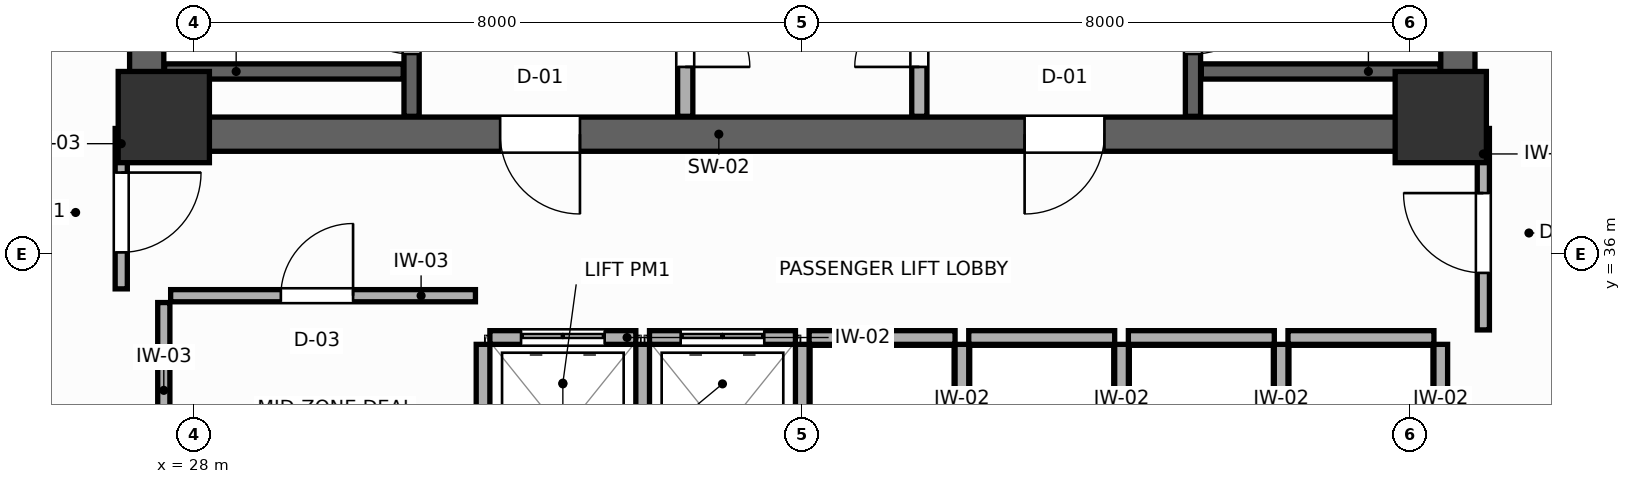
"""IFC4 building model, lengths in metres.
Left out: names, types, materials, properties, quantities, classifications, styles, units other than length and angle.
Written with IfcOpenShell. Run it as: python <this file> out.ifc"""

import sys

from ifc_helpers import new_model, si_unit, direction, frame, frame_2d, origin, origin_2d, place, context, subcontext, project, spatial, rectangle, extrude, source, transform, mapped, element, fill, save


model = new_model("IFC4")
c1 = context("Model", 3, precision=1e-05, world=origin(), true_north=direction((0.0, 1.0)))
c2 = subcontext(c1, "Body", "Model", "MODEL_VIEW")
j1 = project(units=[si_unit("LENGTHUNIT", "METRE"), si_unit("PLANEANGLEUNIT", "RADIAN")], contexts=[c1])
p1 = place(None, origin())
s1 = spatial("IfcSite", under=j1, at=p1, CompositionType="ELEMENT")
p2 = place(p1, origin())
s2 = spatial("IfcBuilding", under=s1, at=p2, CompositionType="ELEMENT")
p3 = place(p2, frame((0.0, 0.0, 113.4)))
s3 = spatial("IfcBuildingStorey", under=s2, at=p3, CompositionType="ELEMENT", Elevation=113.4)
p4 = place(p3, frame((27.15, 37.575, 0.0), z_axis=(0.0, 0.0, 1.0), x_axis=(1.0, 0.0, 0.0)))
e1 = element("IfcWall", 1, at=p4, inside=s3, PredefinedType="SHEAR", context=c2, shape_type="SweptSolid", body=[
    extrude(rectangle(XDim=17.7, YDim=0.45, at=frame_2d((8.85, 0.0))), origin(), (0.0, 0.0, 1.0), 3.6),
])
p5 = place(p4, frame((4.875, 0.0, 0.0)))
e2 = element("IfcOpeningElement", 2, at=p5, cuts=e1, PredefinedType="OPENING", context=c2, shape_type="SweptSolid", body=[
    extrude(rectangle(XDim=1.05, YDim=2.1, at=frame_2d((0.525, 1.05))), frame((0.0, 0.235, 0.0), z_axis=(0.0, -1.0, 0.0), x_axis=(1.0, 0.0, 0.0)), (0.0, 0.0, 1.0), 0.47),
])
p6 = place(p4, frame((11.775, 0.0, 0.0)))
e3 = element("IfcOpeningElement", 3, at=p6, cuts=e1, PredefinedType="OPENING", context=c2, shape_type="SweptSolid", body=[
    extrude(rectangle(XDim=1.05, YDim=2.1, at=frame_2d((0.525, 1.05))), frame((0.0, 0.235, 0.0), z_axis=(0.0, -1.0, 0.0), x_axis=(1.0, 0.0, 0.0)), (0.0, 0.0, 1.0), 0.47),
])
for number, where, z_axis, x_axis in (
    (4, (27.375, 37.8, 0.0), (0.0, 0.0, 1.0), (0.0, 1.0, 0.0)),
    (5, (44.625, 37.8, 0.0), (0.0, 0.0, 1.0), (0.0, 1.0, 0.0)),
):
    element("IfcWall", number, at=place(p3, frame(where, z_axis=z_axis, x_axis=x_axis)), inside=s3, PredefinedType="SHEAR", context=c2, shape_type="SweptSolid", body=[
        extrude(rectangle(XDim=9.0, YDim=0.45, at=frame_2d((4.5, 0.0))), origin(), (0.0, 0.0, 1.0), 3.6),
    ])
m1 = source(origin(), c2, "Body", "SweptSolid", [
    extrude(rectangle(XDim=1.2, YDim=1.2, at=origin_2d()), origin(), (0.0, 0.0, 1.0), 3.6),
])
for number, where, z_axis, x_axis in (
    (6, (27.6, 37.8, 0.0), (0.0, 0.0, 1.0), (1.0, 0.0, 0.0)),
    (7, (44.4, 37.8, 0.0), (0.0, 0.0, 1.0), (1.0, 0.0, 0.0)),
):
    element("IfcColumn", number, at=place(p3, frame(where, z_axis=z_axis, x_axis=x_axis)), inside=s3, PredefinedType="COLUMN", context=c2, shape_type="MappedRepresentation", body=[
        mapped(m1, transform((0.0, 0.0, 0.0), scale=1.0)),
    ])
p7 = place(p3, frame((30.86, 37.81, 0.0), z_axis=(0.0, 0.0, 1.0), x_axis=(0.0, 1.0, 0.0)))
e8 = element("IfcWall", 8, at=p7, inside=s3, PredefinedType="SHEAR", context=c2, shape_type="SweptSolid", body=[
    extrude(rectangle(XDim=8.98, YDim=0.2, at=frame_2d((4.49, 0.0))), origin(), (0.0, 0.0, 1.0), 3.6),
])
p8 = place(p7, frame((0.82, 0.0, 0.0)))
e9 = element("IfcOpeningElement", 9, at=p8, cuts=e8, PredefinedType="OPENING", context=c2, shape_type="SweptSolid", body=[
    extrude(rectangle(XDim=1.05, YDim=2.1, at=frame_2d((0.525, 1.05))), frame((0.0, 0.11, 0.0), z_axis=(0.0, -1.0, 0.0), x_axis=(1.0, 0.0, 0.0)), (0.0, 0.0, 1.0), 0.22),
])
p9 = place(p3, frame((27.61, 38.4, 0.0), z_axis=(0.0, 0.0, 1.0), x_axis=(1.0, 0.0, 0.0)))
e10 = element("IfcWall", 10, at=p9, inside=s3, PredefinedType="SHEAR", context=c2, shape_type="SweptSolid", body=[
    extrude(rectangle(XDim=3.14, YDim=0.2, at=frame_2d((1.57, 0.0))), origin(), (0.0, 0.0, 1.0), 3.6),
])
p10 = place(p3, frame((41.14, 37.81, 0.0), z_axis=(0.0, 0.0, 1.0), x_axis=(0.0, 1.0, 0.0)))
e11 = element("IfcWall", 11, at=p10, inside=s3, PredefinedType="SHEAR", context=c2, shape_type="SweptSolid", body=[
    extrude(rectangle(XDim=8.98, YDim=0.2, at=frame_2d((4.49, 0.0))), origin(), (0.0, 0.0, 1.0), 3.6),
])
p11 = place(p10, frame((0.82, 0.0, 0.0)))
e12 = element("IfcOpeningElement", 12, at=p11, cuts=e11, PredefinedType="OPENING", context=c2, shape_type="SweptSolid", body=[
    extrude(rectangle(XDim=1.05, YDim=2.1, at=frame_2d((0.525, 1.05))), frame((0.0, 0.11, 0.0), z_axis=(0.0, -1.0, 0.0), x_axis=(1.0, 0.0, 0.0)), (0.0, 0.0, 1.0), 0.22),
])
p12 = place(p3, frame((41.25, 38.4, 0.0), z_axis=(0.0, 0.0, 1.0), x_axis=(1.0, 0.0, 0.0)))
e13 = element("IfcWall", 13, at=p12, inside=s3, PredefinedType="SHEAR", context=c2, shape_type="SweptSolid", body=[
    extrude(rectangle(XDim=3.14, YDim=0.2, at=frame_2d((1.57, 0.0))), origin(), (0.0, 0.0, 1.0), 3.6),
])
p13 = place(p3, frame((34.46, 37.81, 0.0), z_axis=(0.0, 0.0, 1.0), x_axis=(0.0, 1.0, 0.0)))
e14 = element("IfcWall", 14, at=p13, inside=s3, PredefinedType="PARTITIONING", context=c2, shape_type="SweptSolid", body=[
    extrude(rectangle(XDim=8.98, YDim=0.2, at=frame_2d((4.49, 0.0))), origin(), (0.0, 0.0, 1.0), 3.4),
])
p14 = place(p13, frame((0.65, 0.0, 0.0)))
e15 = element("IfcOpeningElement", 15, at=p14, cuts=e14, PredefinedType="OPENING", context=c2, shape_type="SweptSolid", body=[
    extrude(rectangle(XDim=0.85, YDim=2.05, at=frame_2d((0.425, 1.025))), frame((0.0, 0.11, 0.0), z_axis=(0.0, -1.0, 0.0), x_axis=(1.0, 0.0, 0.0)), (0.0, 0.0, 1.0), 0.22),
])
p15 = place(p3, frame((37.54, 37.81, 0.0), z_axis=(0.0, 0.0, 1.0), x_axis=(0.0, 1.0, 0.0)))
e16 = element("IfcWall", 16, at=p15, inside=s3, PredefinedType="PARTITIONING", context=c2, shape_type="SweptSolid", body=[
    extrude(rectangle(XDim=8.98, YDim=0.2, at=frame_2d((4.49, 0.0))), origin(), (0.0, 0.0, 1.0), 3.4),
])
p16 = place(p15, frame((0.65, 0.0, 0.0)))
e17 = element("IfcOpeningElement", 17, at=p16, cuts=e16, PredefinedType="OPENING", context=c2, shape_type="SweptSolid", body=[
    extrude(rectangle(XDim=0.85, YDim=2.05, at=frame_2d((0.425, 1.025))), frame((0.0, 0.11, 0.0), z_axis=(0.0, -1.0, 0.0), x_axis=(1.0, 0.0, 0.0)), (0.0, 0.0, 1.0), 0.22),
])
p17 = place(p3, frame((31.89, 34.9, 0.0), z_axis=(0.0, 0.0, 1.0), x_axis=(1.0, 0.0, 0.0)))
e18 = element("IfcWall", 18, at=p17, inside=s3, PredefinedType="PARTITIONING", context=c2, shape_type="SweptSolid", body=[
    extrude(rectangle(XDim=1.92, YDim=0.18, at=frame_2d((0.96, 0.0))), origin(), (0.0, 0.0, 1.0), 3.4),
])
p18 = place(p17, frame((0.41, 0.0, 0.0)))
e19 = element("IfcOpeningElement", 19, at=p18, cuts=e18, PredefinedType="OPENING", context=c2, shape_type="SweptSolid", body=[
    extrude(rectangle(XDim=1.1, YDim=2.1, at=frame_2d((0.55, 1.05))), frame((0.0, 0.1, 0.0), z_axis=(0.0, -1.0, 0.0), x_axis=(1.0, 0.0, 0.0)), (0.0, 0.0, 1.0), 0.2),
])
p19 = place(p3, frame((31.8, 32.49, 0.0), z_axis=(0.0, 0.0, 1.0), x_axis=(0.0, 1.0, 0.0)))
e20 = element("IfcWall", 20, at=p19, inside=s3, PredefinedType="PARTITIONING", context=c2, shape_type="SweptSolid", body=[
    extrude(rectangle(XDim=2.32, YDim=0.18, at=frame_2d((1.16, 0.0))), origin(), (0.0, 0.0, 1.0), 3.4),
])
p20 = place(p3, frame((33.99, 34.9, 0.0), z_axis=(0.0, 0.0, 1.0), x_axis=(1.0, 0.0, 0.0)))
e21 = element("IfcWall", 21, at=p20, inside=s3, PredefinedType="PARTITIONING", context=c2, shape_type="SweptSolid", body=[
    extrude(rectangle(XDim=1.92, YDim=0.18, at=frame_2d((0.96, 0.0))), origin(), (0.0, 0.0, 1.0), 3.4),
])
p21 = place(p20, frame((0.41, 0.0, 0.0)))
e22 = element("IfcOpeningElement", 22, at=p21, cuts=e21, PredefinedType="OPENING", context=c2, shape_type="SweptSolid", body=[
    extrude(rectangle(XDim=1.1, YDim=2.1, at=frame_2d((0.55, 1.05))), frame((0.0, 0.1, 0.0), z_axis=(0.0, -1.0, 0.0), x_axis=(1.0, 0.0, 0.0)), (0.0, 0.0, 1.0), 0.2),
])
p22 = place(p3, frame((33.9, 32.49, 0.0), z_axis=(0.0, 0.0, 1.0), x_axis=(0.0, 1.0, 0.0)))
e23 = element("IfcWall", 23, at=p22, inside=s3, PredefinedType="PARTITIONING", context=c2, shape_type="SweptSolid", body=[
    extrude(rectangle(XDim=2.32, YDim=0.18, at=frame_2d((1.16, 0.0))), origin(), (0.0, 0.0, 1.0), 3.4),
])
p23 = place(p3, frame((36.09, 34.9, 0.0), z_axis=(0.0, 0.0, 1.0), x_axis=(1.0, 0.0, 0.0)))
e24 = element("IfcWall", 24, at=p23, inside=s3, PredefinedType="PARTITIONING", context=c2, shape_type="SweptSolid", body=[
    extrude(rectangle(XDim=1.92, YDim=0.18, at=frame_2d((0.96, 0.0))), origin(), (0.0, 0.0, 1.0), 3.4),
])
p24 = place(p3, frame((36.0, 32.49, 0.0), z_axis=(0.0, 0.0, 1.0), x_axis=(0.0, 1.0, 0.0)))
e25 = element("IfcWall", 25, at=p24, inside=s3, PredefinedType="PARTITIONING", context=c2, shape_type="SweptSolid", body=[
    extrude(rectangle(XDim=2.32, YDim=0.18, at=frame_2d((1.16, 0.0))), origin(), (0.0, 0.0, 1.0), 3.4),
])
p25 = place(p3, frame((38.19, 34.9, 0.0), z_axis=(0.0, 0.0, 1.0), x_axis=(1.0, 0.0, 0.0)))
e26 = element("IfcWall", 26, at=p25, inside=s3, PredefinedType="PARTITIONING", context=c2, shape_type="SweptSolid", body=[
    extrude(rectangle(XDim=1.92, YDim=0.18, at=frame_2d((0.96, 0.0))), origin(), (0.0, 0.0, 1.0), 3.4),
])
p26 = place(p3, frame((38.1, 32.49, 0.0), z_axis=(0.0, 0.0, 1.0), x_axis=(0.0, 1.0, 0.0)))
e27 = element("IfcWall", 27, at=p26, inside=s3, PredefinedType="PARTITIONING", context=c2, shape_type="SweptSolid", body=[
    extrude(rectangle(XDim=2.32, YDim=0.18, at=frame_2d((1.16, 0.0))), origin(), (0.0, 0.0, 1.0), 3.4),
])
p27 = place(p3, frame((40.29, 34.9, 0.0), z_axis=(0.0, 0.0, 1.0), x_axis=(1.0, 0.0, 0.0)))
e28 = element("IfcWall", 28, at=p27, inside=s3, PredefinedType="PARTITIONING", context=c2, shape_type="SweptSolid", body=[
    extrude(rectangle(XDim=1.92, YDim=0.18, at=frame_2d((0.96, 0.0))), origin(), (0.0, 0.0, 1.0), 3.4),
])
p28 = place(p3, frame((40.2, 32.49, 0.0), z_axis=(0.0, 0.0, 1.0), x_axis=(0.0, 1.0, 0.0)))
e29 = element("IfcWall", 29, at=p28, inside=s3, PredefinedType="PARTITIONING", context=c2, shape_type="SweptSolid", body=[
    extrude(rectangle(XDim=2.32, YDim=0.18, at=frame_2d((1.16, 0.0))), origin(), (0.0, 0.0, 1.0), 3.4),
])
p29 = place(p3, frame((42.39, 34.9, 0.0), z_axis=(0.0, 0.0, 1.0), x_axis=(1.0, 0.0, 0.0)))
e30 = element("IfcWall", 30, at=p29, inside=s3, PredefinedType="PARTITIONING", context=c2, shape_type="SweptSolid", body=[
    extrude(rectangle(XDim=1.92, YDim=0.18, at=frame_2d((0.96, 0.0))), origin(), (0.0, 0.0, 1.0), 3.4),
])
for number, where, z_axis, x_axis in (
    (31, (42.3, 32.49, 0.0), (0.0, 0.0, 1.0), (0.0, 1.0, 0.0)),
    (32, (44.4, 32.49, 0.0), (0.0, 0.0, 1.0), (0.0, 1.0, 0.0)),
):
    element("IfcWall", number, at=place(p3, frame(where, z_axis=z_axis, x_axis=x_axis)), inside=s3, PredefinedType="PARTITIONING", context=c2, shape_type="SweptSolid", body=[
        extrude(rectangle(XDim=2.32, YDim=0.18, at=frame_2d((1.16, 0.0))), origin(), (0.0, 0.0, 1.0), 3.4),
    ])
p30 = place(p3, frame((27.6, 33.05, 0.0), z_axis=(0.0, 0.0, 1.0), x_axis=(0.0, 1.0, 0.0)))
e33 = element("IfcWall", 33, at=p30, inside=s3, PredefinedType="PARTITIONING", context=c2, shape_type="SweptSolid", body=[
    extrude(rectangle(XDim=2.31, YDim=0.16, at=frame_2d((1.155, 0.0))), origin(), (0.0, 0.0, 1.0), 3.4),
])
p31 = place(p3, frame((27.69, 35.45, 0.0), z_axis=(0.0, 0.0, 1.0), x_axis=(1.0, 0.0, 0.0)))
e34 = element("IfcWall", 34, at=p31, inside=s3, PredefinedType="PARTITIONING", context=c2, shape_type="SweptSolid", body=[
    extrude(rectangle(XDim=4.01, YDim=0.16, at=frame_2d((2.005, 0.0))), origin(), (0.0, 0.0, 1.0), 3.4),
])
p32 = place(p31, frame((1.45, 0.0, 0.0)))
e35 = element("IfcOpeningElement", 35, at=p32, cuts=e34, PredefinedType="OPENING", context=c2, shape_type="SweptSolid", body=[
    extrude(rectangle(XDim=0.95, YDim=2.05, at=frame_2d((0.475, 1.025))), frame((0.0, 0.09, 0.0), z_axis=(0.0, -1.0, 0.0), x_axis=(1.0, 0.0, 0.0)), (0.0, 0.0, 1.0), 0.18),
])
p33 = place(p3, frame((27.04, 35.54, 0.0), z_axis=(0.0, 0.0, 1.0), x_axis=(0.0, 1.0, 0.0)))
e36 = element("IfcWall", 36, at=p33, inside=s3, PredefinedType="PARTITIONING", context=c2, shape_type="SweptSolid", body=[
    extrude(rectangle(XDim=2.11, YDim=0.16, at=frame_2d((1.055, 0.0))), origin(), (0.0, 0.0, 1.0), 3.4),
])
p34 = place(p33, frame((0.48, 0.0, 0.0)))
e37 = element("IfcOpeningElement", 37, at=p34, cuts=e36, PredefinedType="OPENING", context=c2, shape_type="SweptSolid", body=[
    extrude(rectangle(XDim=1.05, YDim=2.1, at=frame_2d((0.525, 1.05))), frame((0.0, 0.09, 0.0), z_axis=(0.0, -1.0, 0.0), x_axis=(1.0, 0.0, 0.0)), (0.0, 0.0, 1.0), 0.18),
])
p35 = place(p3, frame((44.96, 35.0, 0.0), z_axis=(0.0, 0.0, 1.0), x_axis=(0.0, 1.0, 0.0)))
e38 = element("IfcWall", 38, at=p35, inside=s3, PredefinedType="PARTITIONING", context=c2, shape_type="SweptSolid", body=[
    extrude(rectangle(XDim=2.65, YDim=0.16, at=frame_2d((1.325, 0.0))), origin(), (0.0, 0.0, 1.0), 3.4),
])
p36 = place(p35, frame((0.75, 0.0, 0.0)))
e39 = element("IfcOpeningElement", 39, at=p36, cuts=e38, PredefinedType="OPENING", context=c2, shape_type="SweptSolid", body=[
    extrude(rectangle(XDim=1.05, YDim=2.1, at=frame_2d((0.525, 1.05))), frame((0.0, 0.09, 0.0), z_axis=(0.0, -1.0, 0.0), x_axis=(1.0, 0.0, 0.0)), (0.0, 0.0, 1.0), 0.18),
])
p37 = place(p8, origin())
e40 = element("IfcDoor", 40, at=p37, inside=s3, OperationType="SINGLE_SWING_RIGHT", PredefinedType="DOOR", context=c2, shape_type="SweptSolid", body=[
    extrude(rectangle(XDim=1.05, YDim=2.1, at=frame_2d((0.525, 1.05))), frame((0.0, 0.025, 0.0), z_axis=(0.0, -1.0, 0.0), x_axis=(1.0, 0.0, 0.0)), (0.0, 0.0, 1.0), 0.05),
])
fill(e9, e40)
p38 = place(p11, frame((1.05, 0.0, 0.0), z_axis=(0.0, 0.0, 1.0), x_axis=(-1.0, 0.0, 0.0)))
e41 = element("IfcDoor", 41, at=p38, inside=s3, OperationType="SINGLE_SWING_LEFT", PredefinedType="DOOR", context=c2, shape_type="SweptSolid", body=[
    extrude(rectangle(XDim=1.05, YDim=2.1, at=frame_2d((0.525, 1.05))), frame((0.0, 0.025, 0.0), z_axis=(0.0, -1.0, 0.0), x_axis=(1.0, 0.0, 0.0)), (0.0, 0.0, 1.0), 0.05),
])
fill(e12, e41)
p39 = place(p14, frame((0.85, 0.0, 0.0), z_axis=(0.0, 0.0, 1.0), x_axis=(-1.0, 0.0, 0.0)))
e42 = element("IfcDoor", 42, at=p39, inside=s3, OperationType="SINGLE_SWING_RIGHT", PredefinedType="DOOR", context=c2, shape_type="SweptSolid", body=[
    extrude(rectangle(XDim=0.85, YDim=2.05, at=frame_2d((0.425, 1.025))), frame((0.0, 0.025, 0.0), z_axis=(0.0, -1.0, 0.0), x_axis=(1.0, 0.0, 0.0)), (0.0, 0.0, 1.0), 0.05),
])
fill(e15, e42)
p40 = place(p16, origin())
e43 = element("IfcDoor", 43, at=p40, inside=s3, OperationType="SINGLE_SWING_LEFT", PredefinedType="DOOR", context=c2, shape_type="SweptSolid", body=[
    extrude(rectangle(XDim=0.85, YDim=2.05, at=frame_2d((0.425, 1.025))), frame((0.0, 0.025, 0.0), z_axis=(0.0, -1.0, 0.0), x_axis=(1.0, 0.0, 0.0)), (0.0, 0.0, 1.0), 0.05),
])
fill(e17, e43)
p41 = place(p18, origin())
e44 = element("IfcDoor", 44, at=p41, inside=s3, OperationType="DOUBLE_DOOR_SLIDING", PredefinedType="DOOR", context=c2, shape_type="SweptSolid", body=[
    extrude(rectangle(XDim=1.1, YDim=2.1, at=frame_2d((0.55, 1.05))), frame((0.0, 0.025, 0.0), z_axis=(0.0, -1.0, 0.0), x_axis=(1.0, 0.0, 0.0)), (0.0, 0.0, 1.0), 0.05),
])
fill(e19, e44)
p42 = place(p21, origin())
e45 = element("IfcDoor", 45, at=p42, inside=s3, OperationType="DOUBLE_DOOR_SLIDING", PredefinedType="DOOR", context=c2, shape_type="SweptSolid", body=[
    extrude(rectangle(XDim=1.1, YDim=2.1, at=frame_2d((0.55, 1.05))), frame((0.0, 0.025, 0.0), z_axis=(0.0, -1.0, 0.0), x_axis=(1.0, 0.0, 0.0)), (0.0, 0.0, 1.0), 0.05),
])
fill(e22, e45)
p43 = place(p32, origin())
e46 = element("IfcDoor", 46, at=p43, inside=s3, OperationType="SINGLE_SWING_RIGHT", PredefinedType="DOOR", context=c2, shape_type="SweptSolid", body=[
    extrude(rectangle(XDim=0.95, YDim=2.05, at=frame_2d((0.475, 1.025))), frame((0.0, 0.025, 0.0), z_axis=(0.0, -1.0, 0.0), x_axis=(1.0, 0.0, 0.0)), (0.0, 0.0, 1.0), 0.05),
])
fill(e35, e46)
p44 = place(p34, frame((1.05, 0.0, 0.0), z_axis=(0.0, 0.0, 1.0), x_axis=(-1.0, 0.0, 0.0)))
e47 = element("IfcDoor", 47, at=p44, inside=s3, OperationType="SINGLE_SWING_LEFT", PredefinedType="DOOR", context=c2, shape_type="SweptSolid", body=[
    extrude(rectangle(XDim=1.05, YDim=2.1, at=frame_2d((0.525, 1.05))), frame((0.0, 0.025, 0.0), z_axis=(0.0, -1.0, 0.0), x_axis=(1.0, 0.0, 0.0)), (0.0, 0.0, 1.0), 0.05),
])
fill(e37, e47)
p45 = place(p36, origin())
e48 = element("IfcDoor", 48, at=p45, inside=s3, OperationType="SINGLE_SWING_RIGHT", PredefinedType="DOOR", context=c2, shape_type="SweptSolid", body=[
    extrude(rectangle(XDim=1.05, YDim=2.1, at=frame_2d((0.525, 1.05))), frame((0.0, 0.025, 0.0), z_axis=(0.0, -1.0, 0.0), x_axis=(1.0, 0.0, 0.0)), (0.0, 0.0, 1.0), 0.05),
])
fill(e39, e48)
p46 = place(p5, frame((1.05, 0.0, 0.0), z_axis=(0.0, 0.0, 1.0), x_axis=(-1.0, 0.0, 0.0)))
e49 = element("IfcDoor", 49, at=p46, inside=s3, OperationType="SINGLE_SWING_LEFT", PredefinedType="DOOR", context=c2, shape_type="SweptSolid", body=[
    extrude(rectangle(XDim=1.05, YDim=2.1, at=frame_2d((0.525, 1.05))), frame((0.0, 0.025, 0.0), z_axis=(0.0, -1.0, 0.0), x_axis=(1.0, 0.0, 0.0)), (0.0, 0.0, 1.0), 0.05),
])
fill(e2, e49)
p47 = place(p6, frame((1.05, 0.0, 0.0), z_axis=(0.0, 0.0, 1.0), x_axis=(-1.0, 0.0, 0.0)))
e50 = element("IfcDoor", 50, at=p47, inside=s3, OperationType="SINGLE_SWING_RIGHT", PredefinedType="DOOR", context=c2, shape_type="SweptSolid", body=[
    extrude(rectangle(XDim=1.05, YDim=2.1, at=frame_2d((0.525, 1.05))), frame((0.0, 0.025, 0.0), z_axis=(0.0, -1.0, 0.0), x_axis=(1.0, 0.0, 0.0)), (0.0, 0.0, 1.0), 0.05),
])
fill(e3, e50)
save(model, sys.argv[1])
